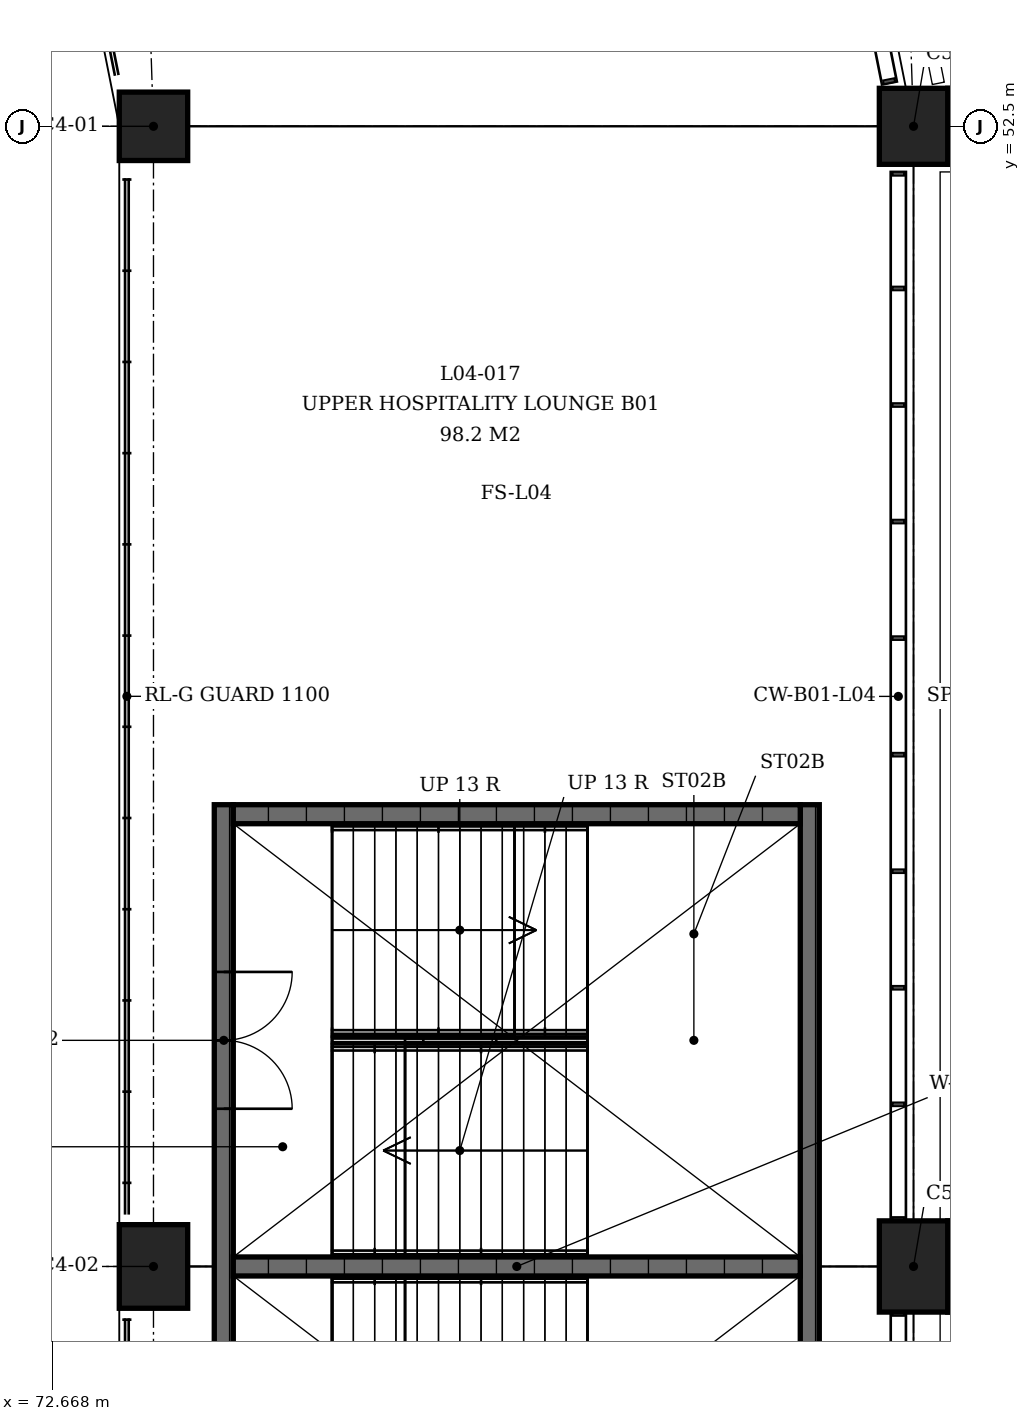
"""IFC4 building model, lengths in metres.
Left out: names, types, materials, properties, quantities, classifications, styles, units other than length and angle.
Written with IfcOpenShell. Run it as: python <this file> out.ifc"""

import sys

from ifc_helpers import new_model, si_unit, direction, frame, frame_2d, origin, origin_2d, place, context, subcontext, project, spatial, rectangle, extrude, element, fill, save


model = new_model("IFC4")
c1 = context("Model", 3, precision=1e-05, world=origin(), true_north=direction((0.0, 1.0)))
c2 = subcontext(c1, "Body", "Model", "MODEL_VIEW")
j1 = project(units=[si_unit("LENGTHUNIT", "METRE"), si_unit("PLANEANGLEUNIT", "RADIAN")], contexts=[c1])
p1 = place(None, origin())
s1 = spatial("IfcSite", under=j1, at=p1, CompositionType="ELEMENT")
p2 = place(p1, origin())
s2 = spatial("IfcBuilding", under=s1, at=p2, CompositionType="ELEMENT")
p3 = place(p2, frame((0.0, 0.0, 18.0)))
s3 = spatial("IfcBuildingStorey", under=s2, at=p3, CompositionType="ELEMENT", Elevation=18.0)
p4 = place(p3, frame((74.0, 52.5, 0.0), z_axis=(0.0, 0.0, 1.0), x_axis=(0.0, 1.0, 0.0)))
e1 = element("IfcColumn", 1, at=p4, inside=s3, PredefinedType="COLUMN", context=c2, shape_type="SweptSolid", body=[
    extrude(rectangle(XDim=0.9, YDim=0.9, at=origin_2d()), origin(), (0.0, 0.0, 1.0), 4.5),
])
p5 = place(p3, frame((84.0, 52.5, 0.0), z_axis=(0.0, 0.0, 1.0), x_axis=(0.0, 1.0, 0.0)))
e2 = element("IfcColumn", 2, at=p5, inside=s3, PredefinedType="COLUMN", context=c2, shape_type="SweptSolid", body=[
    extrude(rectangle(XDim=1.0, YDim=0.9, at=origin_2d()), origin(), (0.0, 0.0, 1.0), 4.5),
])
p6 = place(p3, frame((74.0, 37.5, 0.0), z_axis=(0.0, 0.0, 1.0), x_axis=(0.0, 1.0, 0.0)))
e3 = element("IfcColumn", 3, at=p6, inside=s3, PredefinedType="COLUMN", context=c2, shape_type="SweptSolid", body=[
    extrude(rectangle(XDim=1.1, YDim=0.9, at=origin_2d()), origin(), (0.0, 0.0, 1.0), 4.5),
])
p7 = place(p3, frame((84.0, 37.5, 0.0), z_axis=(0.0, 0.0, 1.0), x_axis=(0.0, 1.0, 0.0)))
e4 = element("IfcColumn", 4, at=p7, inside=s3, PredefinedType="COLUMN", context=c2, shape_type="SweptSolid", body=[
    extrude(rectangle(XDim=1.2, YDim=0.9, at=origin_2d()), origin(), (0.0, 0.0, 1.0), 4.5),
])
p8 = place(p3, frame((74.925, 31.425, 0.0), z_axis=(0.0, 0.0, 1.0), x_axis=(0.0, 1.0, 0.0)))
e5 = element("IfcWall", 5, at=p8, inside=s3, PredefinedType="SHEAR", context=c2, shape_type="SweptSolid", body=[
    extrude(rectangle(XDim=12.15, YDim=0.25, at=frame_2d((6.075, 0.0))), origin(), (0.0, 0.0, 1.0), 4.09),
])
p9 = place(p8, frame((2.2, 0.0, 0.0)))
e6 = element("IfcOpeningElement", 6, at=p9, cuts=e5, PredefinedType="OPENING", context=c2, shape_type="SweptSolid", body=[
    extrude(rectangle(XDim=1.8, YDim=2.1, at=frame_2d((0.9, 1.05))), frame((0.0, 0.125, 0.0), z_axis=(0.0, -1.0, 0.0), x_axis=(1.0, 0.0, 0.0)), (0.0, 0.0, 1.0), 0.25),
])
p10 = place(p8, frame((8.15, 0.0, 0.0)))
e7 = element("IfcOpeningElement", 7, at=p10, cuts=e5, PredefinedType="OPENING", context=c2, shape_type="SweptSolid", body=[
    extrude(rectangle(XDim=1.8, YDim=2.1, at=frame_2d((0.9, 1.05))), frame((0.0, 0.125, 0.0), z_axis=(0.0, -1.0, 0.0), x_axis=(1.0, 0.0, 0.0)), (0.0, 0.0, 1.0), 0.25),
])
p11 = place(p3, frame((82.635, 31.425, 0.0), z_axis=(0.0, 0.0, 1.0), x_axis=(0.0, 1.0, 0.0)))
e8 = element("IfcWall", 8, at=p11, inside=s3, PredefinedType="SHEAR", context=c2, shape_type="SweptSolid", body=[
    extrude(rectangle(XDim=12.15, YDim=0.25, at=frame_2d((6.075, 0.0))), origin(), (0.0, 0.0, 1.0), 4.09),
])
for number, where, z_axis, x_axis in (
    (9, (75.05, 43.45, 0.0), (0.0, 0.0, 1.0), (1.0, 0.0, 0.0)),
    (10, (75.05, 37.5, 0.0), (0.0, 0.0, 1.0), (1.0, 0.0, 0.0)),
):
    element("IfcWall", number, at=place(p3, frame(where, z_axis=z_axis, x_axis=x_axis)), inside=s3, PredefinedType="SHEAR", context=c2, shape_type="SweptSolid", body=[
        extrude(rectangle(XDim=7.46, YDim=0.25, at=frame_2d((3.73, 0.0))), origin(), (0.0, 0.0, 1.0), 4.09),
    ])
p12 = place(p10, origin())
e11 = element("IfcDoor", 11, at=p12, inside=s3, OperationType="DOUBLE_DOOR_SINGLE_SWING", PredefinedType="DOOR", context=c2, shape_type="SweptSolid", body=[
    extrude(rectangle(XDim=1.8, YDim=2.1, at=frame_2d((0.9, 1.05))), frame((0.0, 0.025, 0.0), z_axis=(0.0, -1.0, 0.0), x_axis=(1.0, 0.0, 0.0)), (0.0, 0.0, 1.0), 0.05),
])
fill(e7, e11)
save(model, sys.argv[1])
